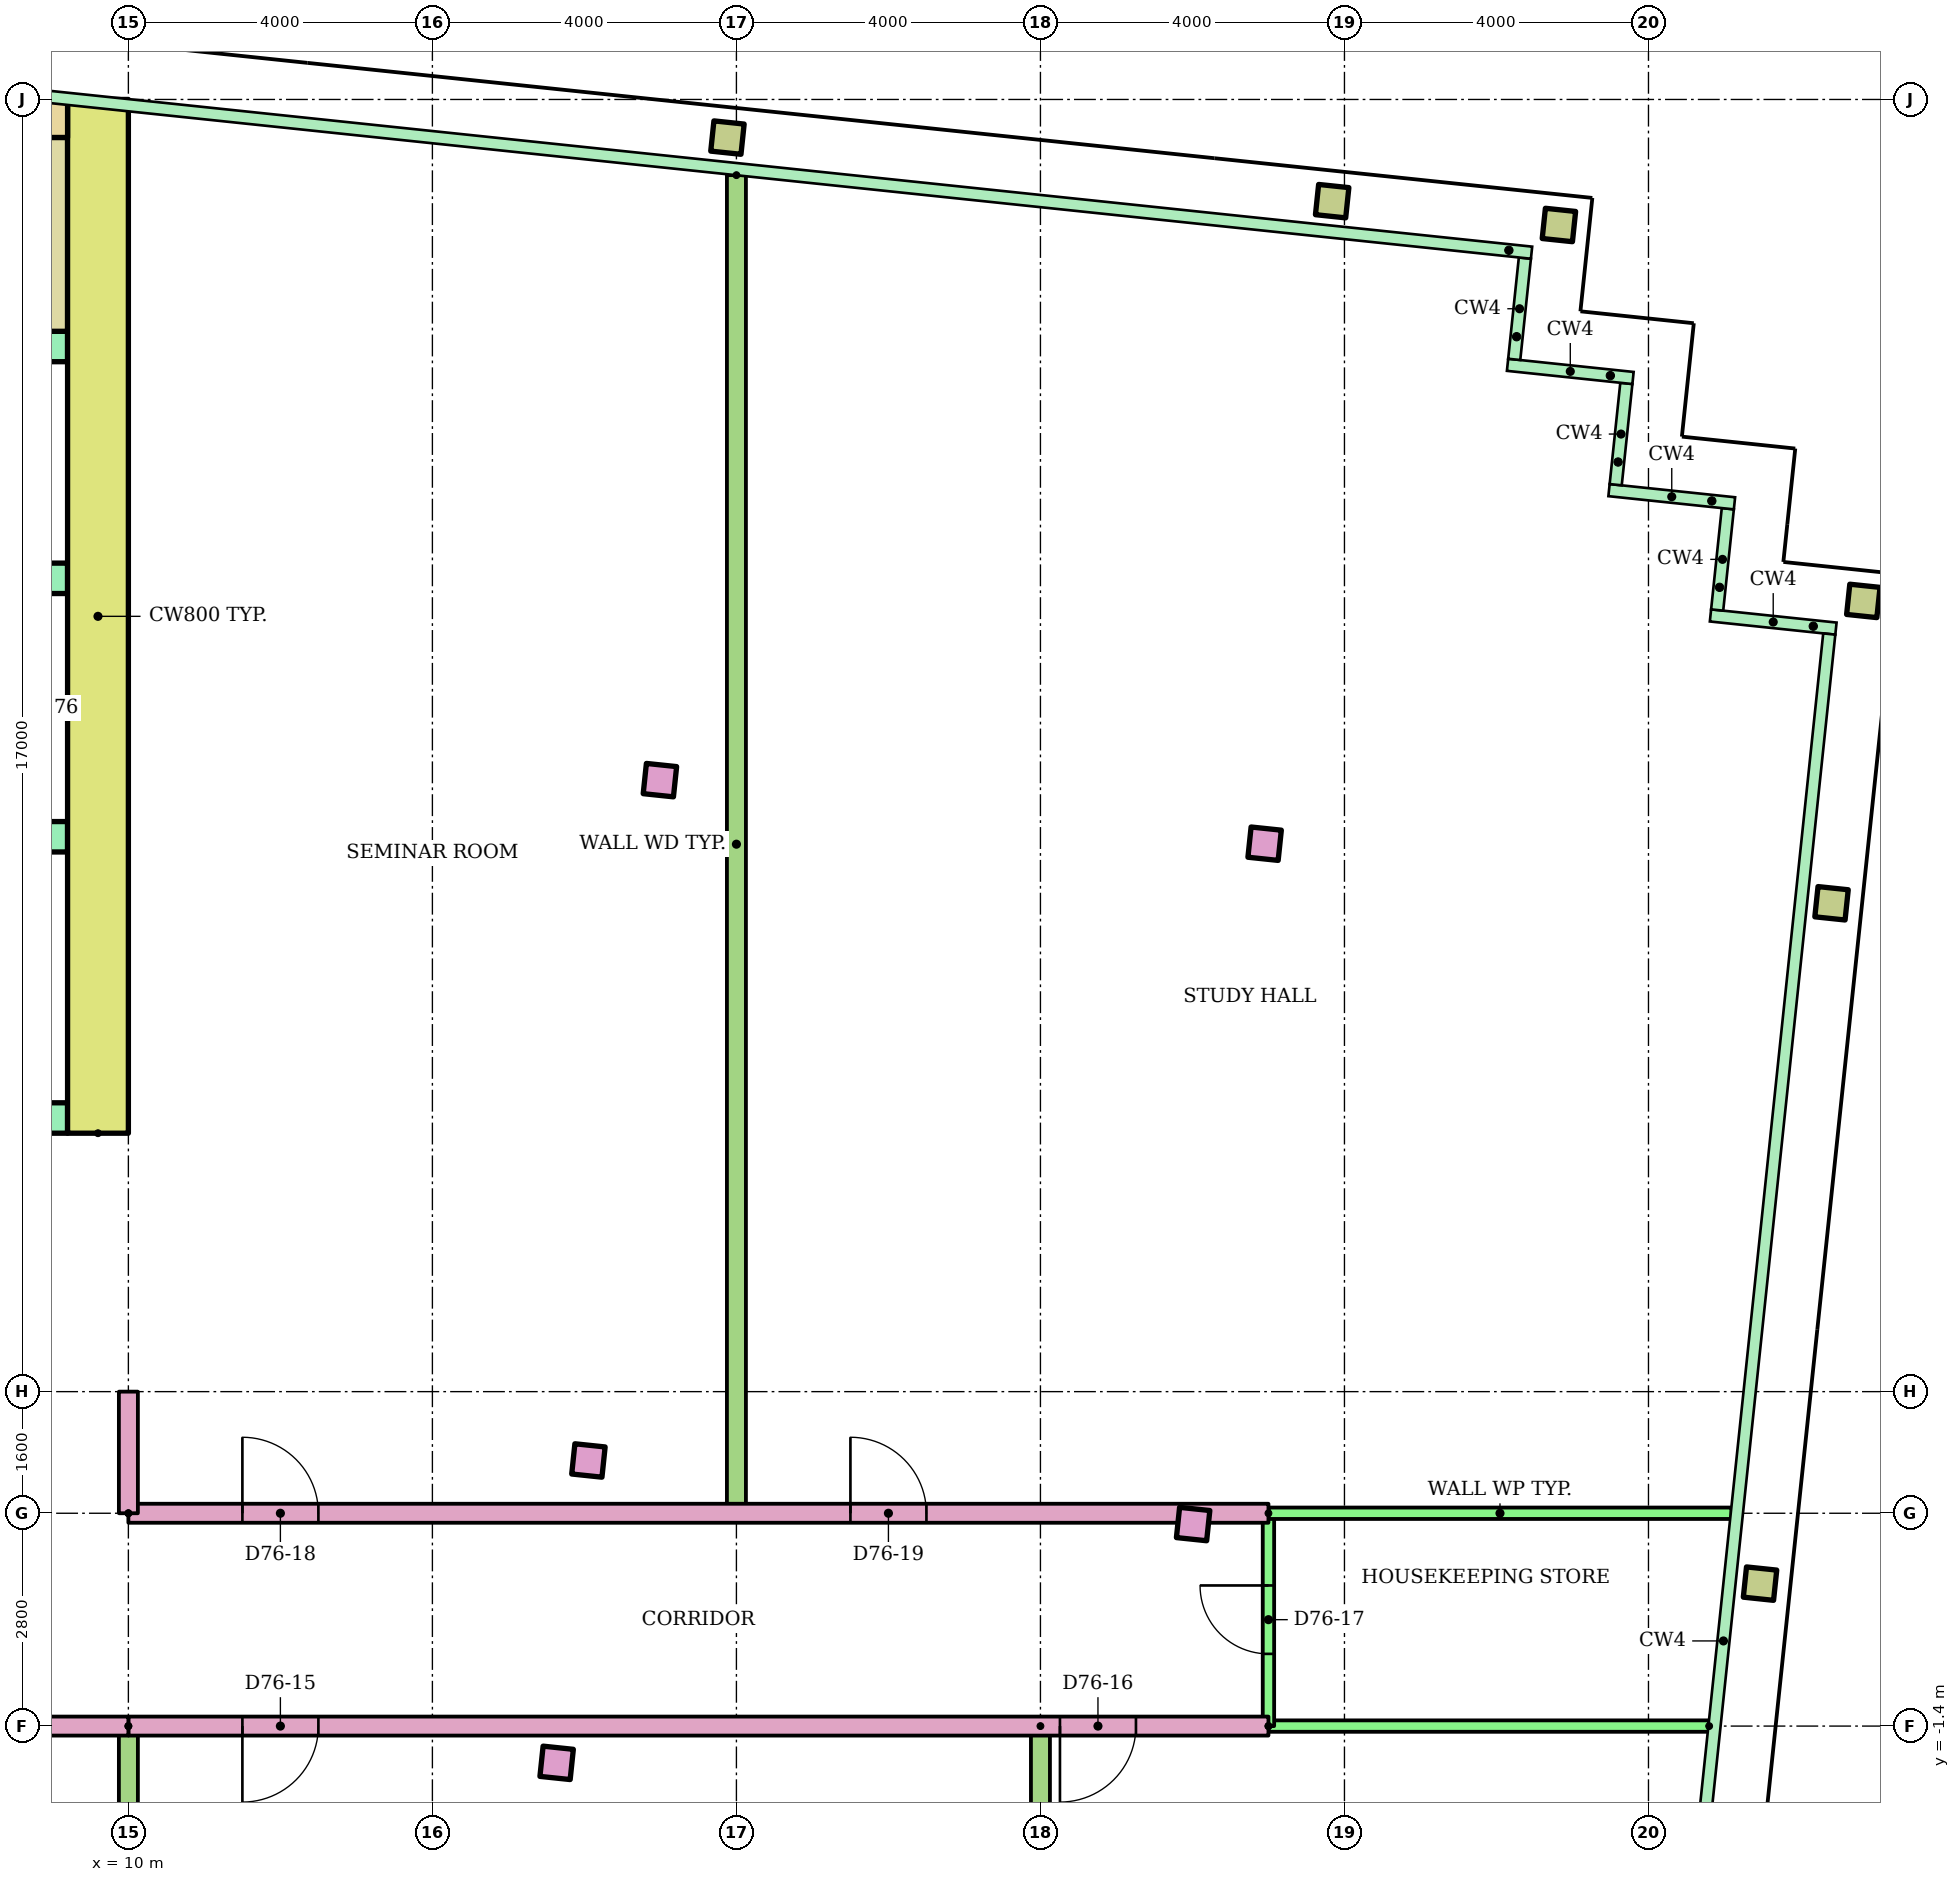
"""IFC4 building model, lengths in metres.
Left out: names, types, materials, properties, quantities, classifications, styles, units other than length and angle.
Written with IfcOpenShell. Run it as: python <this file> out.ifc"""

import sys

from ifc_helpers import new_model, si_unit, direction, frame, frame_2d, origin, origin_2d, place, context, subcontext, project, spatial, rectangle, hollow_rectangle, extrude, element, fill, save


model = new_model("IFC4")
c1 = context("Model", 3, precision=1e-05, world=origin(), true_north=direction((0.0, 1.0)))
c2 = subcontext(c1, "Body", "Model", "MODEL_VIEW")
j1 = project(units=[si_unit("LENGTHUNIT", "METRE"), si_unit("PLANEANGLEUNIT", "RADIAN")], contexts=[c1])
p1 = place(None, origin())
s1 = spatial("IfcSite", under=j1, at=p1, CompositionType="ELEMENT")
p2 = place(p1, origin())
s2 = spatial("IfcBuilding", under=s1, at=p2, CompositionType="ELEMENT")
p3 = place(p2, frame((0.0, 0.0, 294.9)))
s3 = spatial("IfcBuildingStorey", under=s2, at=p3, CompositionType="ELEMENT", Elevation=294.9)
for number, where, z_axis, x_axis in (
    (1, (15.635, -1.884, 0.0), (0.0, 0.0, 1.0), (0.995, -0.105, 0.0)),
    (2, (16.053, 2.094, 0.0), (0.0, 0.0, 1.0), (0.995, -0.105, 0.0)),
    (3, (24.009, 1.258, 0.0), (0.0, 0.0, 1.0), (0.995, -0.105, 0.0)),
):
    element("IfcColumn", number, at=place(p3, frame(where, z_axis=z_axis, x_axis=x_axis)), inside=s3, PredefinedType="COLUMN", context=c2, shape_type="SweptSolid", body=[
        extrude(rectangle(XDim=0.4, YDim=0.4, at=origin_2d()), origin(), (0.0, 0.0, 1.0), 3.4),
    ])
p4 = place(p3, frame((31.468, 0.474, 0.0), z_axis=(0.0, 0.0, 1.0), x_axis=(0.994521895368, -0.104528463268, 0.0)))
e4 = element("IfcColumn", 4, at=p4, inside=s3, PredefinedType="COLUMN", context=c2, shape_type="SweptSolid", body=[
    extrude(hollow_rectangle(XDim=0.4, YDim=0.4, WallThickness=0.02, at=origin_2d()), origin(), (0.0, 0.0, 1.0), 3.4),
])
for number, where, z_axis, x_axis in (
    (5, (16.993, 11.045, 0.0), (0.0, 0.0, 1.0), (0.995, -0.105, 0.0)),
    (6, (24.95, 10.209, 0.0), (0.0, 0.0, 1.0), (0.995, -0.105, 0.0)),
):
    element("IfcColumn", number, at=place(p3, frame(where, z_axis=z_axis, x_axis=x_axis)), inside=s3, PredefinedType="COLUMN", context=c2, shape_type="SweptSolid", body=[
        extrude(rectangle(XDim=0.4, YDim=0.4, at=origin_2d()), origin(), (0.0, 0.0, 1.0), 3.4),
    ])
for number, where, z_axis, x_axis in (
    (7, (32.409, 9.425, 0.0), (0.0, 0.0, 1.0), (0.995, -0.105, 0.0)),
    (8, (32.827, 13.403, 0.0), (0.0, 0.0, 1.0), (0.995, -0.105, 0.0)),
    (9, (17.882, 19.498, 0.0), (0.0, 0.0, 1.0), (0.995, -0.105, 0.0)),
    (10, (25.838, 18.662, 0.0), (0.0, 0.0, 1.0), (0.995, -0.105, 0.0)),
    (11, (28.822, 18.349, 0.0), (0.0, 0.0, 1.0), (0.995, -0.105, 0.0)),
):
    element("IfcColumn", number, at=place(p3, frame(where, z_axis=z_axis, x_axis=x_axis)), inside=s3, PredefinedType="COLUMN", context=c2, shape_type="SweptSolid", body=[
        extrude(hollow_rectangle(XDim=0.4, YDim=0.4, WallThickness=0.02, at=origin_2d()), origin(), (0.0, 0.0, 1.0), 3.4),
    ])
p5 = place(p3, frame((9.6, 6.4, 0.0), z_axis=(0.0, 0.0, 1.0), x_axis=(0.0, 1.0, 0.0)))
e12 = element("IfcWall", 12, at=p5, inside=s3, PredefinedType="SHEAR", context=c2, shape_type="SweptSolid", body=[
    extrude(rectangle(XDim=13.6, YDim=0.8, at=frame_2d((6.8, 0.0))), origin(), (0.0, 0.0, 1.0), 3.12),
])
p6 = place(p3, frame((-9.2, 19.75, 0.0)))
e13 = element("IfcWall", 13, at=p6, inside=s3, PredefinedType="SHEAR", context=c2, shape_type="SweptSolid", body=[
    extrude(rectangle(XDim=18.4, YDim=0.5, at=frame_2d((9.2, 0.0))), origin(), (0.0, 0.0, 1.0), 3.12),
])
p7 = place(p3, frame((-9.2, 6.6, 0.0)))
e14 = element("IfcWall", 14, at=p7, inside=s3, PredefinedType="SHEAR", context=c2, shape_type="SweptSolid", body=[
    extrude(rectangle(XDim=18.4, YDim=0.4, at=frame_2d((9.2, 0.0))), origin(), (0.0, 0.0, 1.0), 3.12),
])
p8 = place(p7, frame((8.3, 0.0, 0.0)))
e15 = element("IfcOpeningElement", 15, at=p8, cuts=e14, PredefinedType="OPENING", context=c2, shape_type="SweptSolid", body=[
    extrude(rectangle(XDim=1.8, YDim=2.1, at=frame_2d((0.9, 1.05))), frame((0.0, 0.21, 0.0), z_axis=(0.0, -1.0, 0.0), x_axis=(1.0, 0.0, 0.0)), (0.0, 0.0, 1.0), 0.42),
])
p9 = place(p7, frame((3.8, 0.0, 0.0)))
e16 = element("IfcOpeningElement", 16, at=p9, cuts=e14, PredefinedType="OPENING", context=c2, shape_type="SweptSolid", body=[
    extrude(rectangle(XDim=1.8, YDim=2.1, at=frame_2d((0.9, 1.05))), frame((0.0, 0.21, 0.0), z_axis=(0.0, -1.0, 0.0), x_axis=(1.0, 0.0, 0.0)), (0.0, 0.0, 1.0), 0.42),
])
p10 = place(p7, frame((12.8, 0.0, 0.0)))
e17 = element("IfcOpeningElement", 17, at=p10, cuts=e14, PredefinedType="OPENING", context=c2, shape_type="SweptSolid", body=[
    extrude(rectangle(XDim=1.8, YDim=2.1, at=frame_2d((0.9, 1.05))), frame((0.0, 0.21, 0.0), z_axis=(0.0, -1.0, 0.0), x_axis=(1.0, 0.0, 0.0)), (0.0, 0.0, 1.0), 0.42),
])
p11 = place(p3, frame((1.2, 10.3, 0.0)))
e18 = element("IfcWall", 18, at=p11, inside=s3, PredefinedType="SHEAR", context=c2, shape_type="SweptSolid", body=[
    extrude(rectangle(XDim=8.0, YDim=0.4, at=frame_2d((4.0, 0.0))), origin(), (0.0, 0.0, 1.0), 3.12),
])
p12 = place(p11, frame((0.817, 0.0, 0.0)))
e19 = element("IfcOpeningElement", 19, at=p12, cuts=e18, PredefinedType="OPENING", context=c2, shape_type="SweptSolid", body=[
    extrude(rectangle(XDim=1.1, YDim=2.1, at=frame_2d((0.55, 1.05))), frame((0.0, 0.21, 0.0), z_axis=(0.0, -1.0, 0.0), x_axis=(1.0, 0.0, 0.0)), (0.0, 0.0, 1.0), 0.42),
])
p13 = place(p11, frame((3.55, 0.0, 0.0)))
e20 = element("IfcOpeningElement", 20, at=p13, cuts=e18, PredefinedType="OPENING", context=c2, shape_type="SweptSolid", body=[
    extrude(rectangle(XDim=1.1, YDim=2.1, at=frame_2d((0.55, 1.05))), frame((0.0, 0.21, 0.0), z_axis=(0.0, -1.0, 0.0), x_axis=(1.0, 0.0, 0.0)), (0.0, 0.0, 1.0), 0.42),
])
p14 = place(p11, frame((6.283, 0.0, 0.0)))
e21 = element("IfcOpeningElement", 21, at=p14, cuts=e18, PredefinedType="OPENING", context=c2, shape_type="SweptSolid", body=[
    extrude(rectangle(XDim=1.1, YDim=2.1, at=frame_2d((0.55, 1.05))), frame((0.0, 0.21, 0.0), z_axis=(0.0, -1.0, 0.0), x_axis=(1.0, 0.0, 0.0)), (0.0, 0.0, 1.0), 0.42),
])
p15 = place(p3, frame((1.2, 13.7, 0.0)))
e22 = element("IfcWall", 22, at=p15, inside=s3, PredefinedType="SHEAR", context=c2, shape_type="SweptSolid", body=[
    extrude(rectangle(XDim=8.0, YDim=0.4, at=frame_2d((4.0, 0.0))), origin(), (0.0, 0.0, 1.0), 3.12),
])
p16 = place(p3, frame((-9.2, 16.75, 0.0)))
e23 = element("IfcWall", 23, at=p16, inside=s3, PredefinedType="SHEAR", context=c2, shape_type="SweptSolid", body=[
    extrude(rectangle(XDim=18.4, YDim=0.4, at=frame_2d((9.2, 0.0))), origin(), (0.0, 0.0, 1.0), 3.12),
])
p17 = place(p16, frame((0.1, 0.0, 0.0)))
e24 = element("IfcOpeningElement", 24, at=p17, cuts=e23, PredefinedType="OPENING", context=c2, shape_type="SweptSolid", body=[
    extrude(rectangle(XDim=0.95, YDim=2.1, at=frame_2d((0.475, 1.05))), frame((0.0, 0.21, 0.0), z_axis=(0.0, -1.0, 0.0), x_axis=(1.0, 0.0, 0.0)), (0.0, 0.0, 1.0), 0.42),
])
p18 = place(p16, frame((6.1, 0.0, 0.0)))
e25 = element("IfcOpeningElement", 25, at=p18, cuts=e23, PredefinedType="OPENING", context=c2, shape_type="SweptSolid", body=[
    extrude(rectangle(XDim=0.95, YDim=2.1, at=frame_2d((0.475, 1.05))), frame((0.0, 0.21, 0.0), z_axis=(0.0, -1.0, 0.0), x_axis=(1.0, 0.0, 0.0)), (0.0, 0.0, 1.0), 0.42),
])
p19 = place(p16, frame((12.1, 0.0, 0.0)))
e26 = element("IfcOpeningElement", 26, at=p19, cuts=e23, PredefinedType="OPENING", context=c2, shape_type="SweptSolid", body=[
    extrude(rectangle(XDim=0.95, YDim=2.1, at=frame_2d((0.475, 1.05))), frame((0.0, 0.21, 0.0), z_axis=(0.0, -1.0, 0.0), x_axis=(1.0, 0.0, 0.0)), (0.0, 0.0, 1.0), 0.42),
])
p20 = place(p3, frame((8.75, 16.95, 0.0), z_axis=(0.0, 0.0, 1.0), x_axis=(0.0, 1.0, 0.0)))
e27 = element("IfcWall", 27, at=p20, inside=s3, PredefinedType="SHEAR", context=c2, shape_type="SweptSolid", body=[
    extrude(rectangle(XDim=2.55, YDim=0.9, at=frame_2d((1.275, 0.0))), origin(), (0.0, 0.0, 1.0), 3.12),
])
p21 = place(p3, frame((25.0, -1.4, 0.0), z_axis=(0.0, 0.0, 1.0), x_axis=(-1.0, 0.0, 0.0)))
e28 = element("IfcWall", 28, at=p21, inside=s3, PredefinedType="PARTITIONING", context=c2, shape_type="SweptSolid", body=[
    extrude(rectangle(XDim=15.0, YDim=0.25, at=frame_2d((7.5, 0.0))), origin(), (0.0, 0.0, 1.0), 2.6),
])
p22 = place(p21, frame((12.5, 0.0, 0.0)))
e29 = element("IfcOpeningElement", 29, at=p22, cuts=e28, PredefinedType="OPENING", context=c2, shape_type="SweptSolid", body=[
    extrude(rectangle(XDim=1.0, YDim=2.1, at=frame_2d((0.5, 1.05))), frame((0.0, 0.135, 0.0), z_axis=(0.0, -1.0, 0.0), x_axis=(1.0, 0.0, 0.0)), (0.0, 0.0, 1.0), 0.27),
])
p23 = place(p21, frame((1.743, 0.0, 0.0)))
e30 = element("IfcOpeningElement", 30, at=p23, cuts=e28, PredefinedType="OPENING", context=c2, shape_type="SweptSolid", body=[
    extrude(rectangle(XDim=1.0, YDim=2.1, at=frame_2d((0.5, 1.05))), frame((0.0, 0.135, 0.0), z_axis=(0.0, -1.0, 0.0), x_axis=(1.0, 0.0, 0.0)), (0.0, 0.0, 1.0), 0.27),
])
p24 = place(p3, frame((30.798, -1.4, 0.0), z_axis=(0.0, 0.0, 1.0), x_axis=(-1.0, 0.0, 0.0)))
e31 = element("IfcWall", 31, at=p24, inside=s3, PredefinedType="PARTITIONING", context=c2, shape_type="SweptSolid", body=[
    extrude(rectangle(XDim=5.798, YDim=0.15, at=frame_2d((2.899, 0.0))), origin(), (0.0, 0.0, 1.0), 2.6),
])
p25 = place(p3, frame((25.0, -1.4, 0.0), z_axis=(0.0, 0.0, 1.0), x_axis=(0.0, 1.0, 0.0)))
e32 = element("IfcWall", 32, at=p25, inside=s3, PredefinedType="PARTITIONING", context=c2, shape_type="SweptSolid", body=[
    extrude(rectangle(XDim=2.8, YDim=0.15, at=frame_2d((1.4, 0.0))), origin(), (0.0, 0.0, 1.0), 2.6),
])
p26 = place(p25, frame((0.95, 0.0, 0.0)))
e33 = element("IfcOpeningElement", 33, at=p26, cuts=e32, PredefinedType="OPENING", context=c2, shape_type="SweptSolid", body=[
    extrude(rectangle(XDim=0.9, YDim=2.1, at=frame_2d((0.45, 1.05))), frame((0.0, 0.085, 0.0), z_axis=(0.0, -1.0, 0.0), x_axis=(1.0, 0.0, 0.0)), (0.0, 0.0, 1.0), 0.17),
])
p27 = place(p3, frame((10.0, -1.4, 0.0), z_axis=(0.0, 0.0, 1.0), x_axis=(0.0, -1.0, 0.0)))
e34 = element("IfcWall", 34, at=p27, inside=s3, PredefinedType="PARTITIONING", context=c2, shape_type="SweptSolid", body=[
    extrude(rectangle(XDim=14.593, YDim=0.25, at=frame_2d((7.297, 0.0))), origin(), (0.0, 0.0, 1.0), 2.6),
])
p28 = place(p3, frame((22.0, -1.4, 0.0), z_axis=(0.0, 0.0, 1.0), x_axis=(0.0, -1.0, 0.0)))
e35 = element("IfcWall", 35, at=p28, inside=s3, PredefinedType="PARTITIONING", context=c2, shape_type="SweptSolid", body=[
    extrude(rectangle(XDim=15.854, YDim=0.25, at=frame_2d((7.927, 0.0))), origin(), (0.0, 0.0, 1.0), 2.6),
])
p29 = place(p3, frame((10.0, 1.4, 0.0)))
e36 = element("IfcWall", 36, at=p29, inside=s3, PredefinedType="PARTITIONING", context=c2, shape_type="SweptSolid", body=[
    extrude(rectangle(XDim=15.0, YDim=0.25, at=frame_2d((7.5, 0.0))), origin(), (0.0, 0.0, 1.0), 2.6),
])
p30 = place(p29, frame((1.5, 0.0, 0.0)))
e37 = element("IfcOpeningElement", 37, at=p30, cuts=e36, PredefinedType="OPENING", context=c2, shape_type="SweptSolid", body=[
    extrude(rectangle(XDim=1.0, YDim=2.1, at=frame_2d((0.5, 1.05))), frame((0.0, 0.135, 0.0), z_axis=(0.0, -1.0, 0.0), x_axis=(1.0, 0.0, 0.0)), (0.0, 0.0, 1.0), 0.27),
])
p31 = place(p29, frame((9.5, 0.0, 0.0)))
e38 = element("IfcOpeningElement", 38, at=p31, cuts=e36, PredefinedType="OPENING", context=c2, shape_type="SweptSolid", body=[
    extrude(rectangle(XDim=1.0, YDim=2.1, at=frame_2d((0.5, 1.05))), frame((0.0, 0.135, 0.0), z_axis=(0.0, -1.0, 0.0), x_axis=(1.0, 0.0, 0.0)), (0.0, 0.0, 1.0), 0.27),
])
p32 = place(p3, frame((25.0, 1.4, 0.0)))
e39 = element("IfcWall", 39, at=p32, inside=s3, PredefinedType="PARTITIONING", context=c2, shape_type="SweptSolid", body=[
    extrude(rectangle(XDim=6.093, YDim=0.15, at=frame_2d((3.046, 0.0))), origin(), (0.0, 0.0, 1.0), 2.6),
])
p33 = place(p3, frame((18.0, 19.004, 0.0), z_axis=(0.0, 0.0, 1.0), x_axis=(0.0, -1.0, 0.0)))
e40 = element("IfcWall", 40, at=p33, inside=s3, PredefinedType="PARTITIONING", context=c2, shape_type="SweptSolid", body=[
    extrude(rectangle(XDim=17.604, YDim=0.25, at=frame_2d((8.802, 0.0))), origin(), (0.0, 0.0, 1.0), 2.6),
])
p34 = place(p3, frame((10.0, -1.4, 0.0), z_axis=(0.0, 0.0, 1.0), x_axis=(-1.0, 0.0, 0.0)))
e41 = element("IfcWall", 41, at=p34, inside=s3, PredefinedType="PARTITIONING", context=c2, shape_type="SweptSolid", body=[
    extrude(rectangle(XDim=20.0, YDim=0.25, at=frame_2d((10.0, 0.0))), origin(), (0.0, 0.0, 1.0), 2.6),
])
p35 = place(p34, frame((17.5, 0.0, 0.0)))
e42 = element("IfcOpeningElement", 42, at=p35, cuts=e41, PredefinedType="OPENING", context=c2, shape_type="SweptSolid", body=[
    extrude(rectangle(XDim=1.0, YDim=2.1, at=frame_2d((0.5, 1.05))), frame((0.0, 0.135, 0.0), z_axis=(0.0, -1.0, 0.0), x_axis=(1.0, 0.0, 0.0)), (0.0, 0.0, 1.0), 0.27),
])
p36 = place(p34, frame((8.944, 0.0, 0.0)))
e43 = element("IfcOpeningElement", 43, at=p36, cuts=e41, PredefinedType="OPENING", context=c2, shape_type="SweptSolid", body=[
    extrude(rectangle(XDim=1.0, YDim=2.1, at=frame_2d((0.5, 1.05))), frame((0.0, 0.135, 0.0), z_axis=(0.0, -1.0, 0.0), x_axis=(1.0, 0.0, 0.0)), (0.0, 0.0, 1.0), 0.27),
])
p37 = place(p3, frame((10.0, 1.4, 0.0), z_axis=(0.0, 0.0, 1.0), x_axis=(0.0, 1.0, 0.0)))
e44 = element("IfcWall", 44, at=p37, inside=s3, PredefinedType="PARTITIONING", context=c2, shape_type="SweptSolid", body=[
    extrude(rectangle(XDim=1.6, YDim=0.25, at=frame_2d((0.8, 0.0))), origin(), (0.0, 0.0, 1.0), 2.6),
])
p38 = place(p22, origin())
e45 = element("IfcDoor", 45, at=p38, inside=s3, OperationType="SINGLE_SWING_RIGHT", PredefinedType="DOOR", context=c2, shape_type="SweptSolid", body=[
    extrude(rectangle(XDim=1.0, YDim=2.1, at=frame_2d((0.5, 1.05))), frame((0.0, 0.025, 0.0), z_axis=(0.0, -1.0, 0.0), x_axis=(1.0, 0.0, 0.0)), (0.0, 0.0, 1.0), 0.05),
])
fill(e29, e45)
p39 = place(p23, origin())
e46 = element("IfcDoor", 46, at=p39, inside=s3, OperationType="SINGLE_SWING_RIGHT", PredefinedType="DOOR", context=c2, shape_type="SweptSolid", body=[
    extrude(rectangle(XDim=1.0, YDim=2.1, at=frame_2d((0.5, 1.05))), frame((0.0, 0.025, 0.0), z_axis=(0.0, -1.0, 0.0), x_axis=(1.0, 0.0, 0.0)), (0.0, 0.0, 1.0), 0.05),
])
fill(e30, e46)
p40 = place(p26, origin())
e47 = element("IfcDoor", 47, at=p40, inside=s3, OperationType="SINGLE_SWING_RIGHT", PredefinedType="DOOR", context=c2, shape_type="SweptSolid", body=[
    extrude(rectangle(XDim=0.9, YDim=2.1, at=frame_2d((0.45, 1.05))), frame((0.0, 0.025, 0.0), z_axis=(0.0, -1.0, 0.0), x_axis=(1.0, 0.0, 0.0)), (0.0, 0.0, 1.0), 0.05),
])
fill(e33, e47)
p41 = place(p30, origin())
e48 = element("IfcDoor", 48, at=p41, inside=s3, OperationType="SINGLE_SWING_LEFT", PredefinedType="DOOR", context=c2, shape_type="SweptSolid", body=[
    extrude(rectangle(XDim=1.0, YDim=2.1, at=frame_2d((0.5, 1.05))), frame((0.0, 0.025, 0.0), z_axis=(0.0, -1.0, 0.0), x_axis=(1.0, 0.0, 0.0)), (0.0, 0.0, 1.0), 0.05),
])
fill(e37, e48)
p42 = place(p31, origin())
e49 = element("IfcDoor", 49, at=p42, inside=s3, OperationType="SINGLE_SWING_LEFT", PredefinedType="DOOR", context=c2, shape_type="SweptSolid", body=[
    extrude(rectangle(XDim=1.0, YDim=2.1, at=frame_2d((0.5, 1.05))), frame((0.0, 0.025, 0.0), z_axis=(0.0, -1.0, 0.0), x_axis=(1.0, 0.0, 0.0)), (0.0, 0.0, 1.0), 0.05),
])
fill(e38, e49)
save(model, sys.argv[1])
